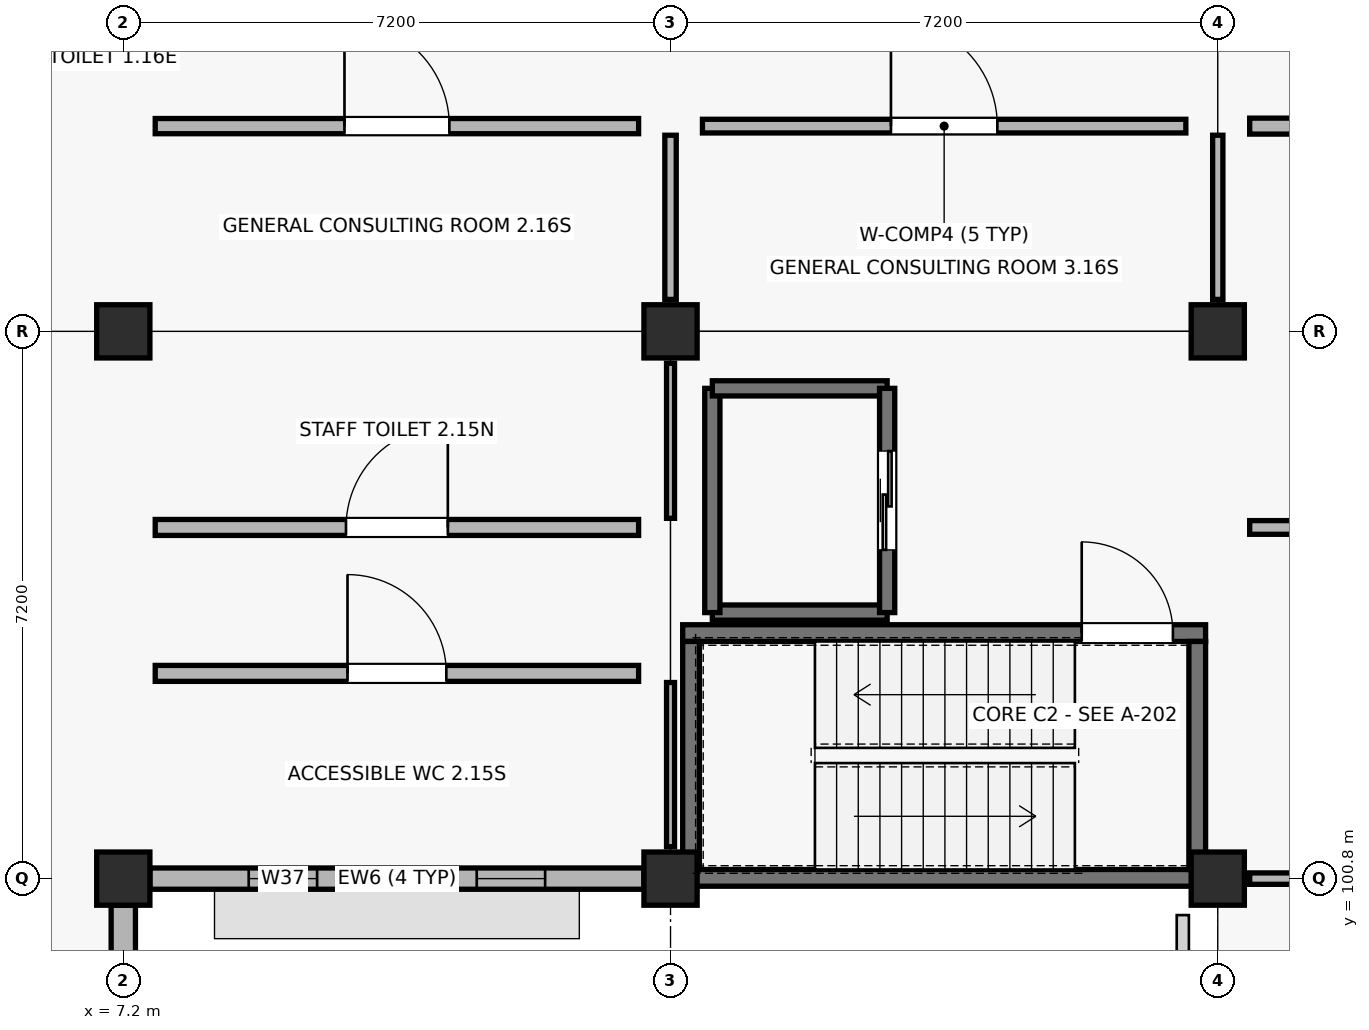
"""IFC4 building model, lengths in metres.
Left out: names, types, materials, properties, quantities, classifications, styles, units other than length and angle.
Written with IfcOpenShell. Run it as: python <this file> out.ifc"""

import sys

from ifc_helpers import new_model, si_unit, direction, frame, frame_2d, origin, origin_2d, place, context, subcontext, project, spatial, rectangle, extrude, element, fill, save


model = new_model("IFC4")
c1 = context("Model", 3, precision=1e-05, world=origin(), true_north=direction((0.0, 1.0)))
c2 = subcontext(c1, "Body", "Model", "MODEL_VIEW")
j1 = project(units=[si_unit("LENGTHUNIT", "METRE"), si_unit("PLANEANGLEUNIT", "RADIAN")], contexts=[c1])
p1 = place(None, origin())
s1 = spatial("IfcSite", under=j1, at=p1, CompositionType="ELEMENT")
p2 = place(p1, origin())
s2 = spatial("IfcBuilding", under=s1, at=p2, CompositionType="ELEMENT")
p3 = place(p2, frame((0.0, 0.0, 4.5)))
s3 = spatial("IfcBuildingStorey", under=s2, at=p3, CompositionType="ELEMENT", Elevation=4.5)
for number, where, z_axis, x_axis in (
    (1, (7.2, 100.8, 0.0), (0.0, 0.0, 1.0), (1.0, 0.0, 0.0)),
    (2, (7.2, 108.0, 0.0), (0.0, 0.0, 1.0), (1.0, 0.0, 0.0)),
    (3, (14.4, 100.8, 0.0), (0.0, 0.0, 1.0), (1.0, 0.0, 0.0)),
    (4, (14.4, 108.0, 0.0), (0.0, 0.0, 1.0), (1.0, 0.0, 0.0)),
    (5, (21.6, 100.8, 0.0), (0.0, 0.0, 1.0), (1.0, 0.0, 0.0)),
    (6, (21.6, 108.0, 0.0), (0.0, 0.0, 1.0), (1.0, 0.0, 0.0)),
):
    element("IfcColumn", number, at=place(p3, frame(where, z_axis=z_axis, x_axis=x_axis)), inside=s3, PredefinedType="COLUMN", context=c2, shape_type="SweptSolid", body=[
        extrude(rectangle(XDim=0.7, YDim=0.7, at=origin_2d()), origin(), (0.0, 0.0, 1.0), 4.5),
    ])
p4 = place(p3, frame((7.2, 93.95, 0.0), z_axis=(0.0, 0.0, 1.0), x_axis=(0.0, 1.0, 0.0)))
e7 = element("IfcWall", 7, at=p4, inside=s3, PredefinedType="STANDARD", context=c2, shape_type="SweptSolid", body=[
    extrude(rectangle(XDim=6.5, YDim=0.32, at=frame_2d((3.25, 0.0))), origin(), (0.0, 0.0, 1.0), 3.52),
])
p5 = place(p3, frame((7.55, 100.8, 0.0), z_axis=(0.0, 0.0, 1.0), x_axis=(1.0, 0.0, 0.0)))
e8 = element("IfcWall", 8, at=p5, inside=s3, PredefinedType="STANDARD", context=c2, shape_type="SweptSolid", body=[
    extrude(rectangle(XDim=6.5, YDim=0.28, at=frame_2d((3.25, 0.0))), origin(), (0.0, 0.0, 1.0), 3.47),
])
p6 = place(p5, frame((1.3, 0.0, 0.9)))
e9 = element("IfcOpeningElement", 9, at=p6, cuts=e8, PredefinedType="OPENING", context=c2, shape_type="SweptSolid", body=[
    extrude(rectangle(XDim=0.9, YDim=1.75, at=frame_2d((0.45, 0.875))), frame((0.0, 0.15, 0.0), z_axis=(0.0, -1.0, 0.0), x_axis=(1.0, 0.0, 0.0)), (0.0, 0.0, 1.0), 0.3),
])
p7 = place(p5, frame((4.3, 0.0, 0.9)))
e10 = element("IfcOpeningElement", 10, at=p7, cuts=e8, PredefinedType="OPENING", context=c2, shape_type="SweptSolid", body=[
    extrude(rectangle(XDim=0.9, YDim=1.75, at=frame_2d((0.45, 0.875))), frame((0.0, 0.15, 0.0), z_axis=(0.0, -1.0, 0.0), x_axis=(1.0, 0.0, 0.0)), (0.0, 0.0, 1.0), 0.3),
])
p8 = place(p3, frame((14.56, 100.81, 0.0), z_axis=(0.0, 0.0, 1.0), x_axis=(1.0, 0.0, 0.0)))
e11 = element("IfcWall", 11, at=p8, inside=s3, PredefinedType="SHEAR", context=c2, shape_type="SweptSolid", body=[
    extrude(rectangle(XDim=6.88, YDim=0.22, at=frame_2d((3.44, 0.0))), origin(), (0.0, 0.0, 1.0), 4.22),
])
p9 = place(p3, frame((14.56, 104.03, 0.0), z_axis=(0.0, 0.0, 1.0), x_axis=(1.0, 0.0, 0.0)))
e12 = element("IfcWall", 12, at=p9, inside=s3, PredefinedType="SHEAR", context=c2, shape_type="SweptSolid", body=[
    extrude(rectangle(XDim=6.88, YDim=0.22, at=frame_2d((3.44, 0.0))), origin(), (0.0, 0.0, 1.0), 4.22),
])
p10 = place(p9, frame((5.25, 0.0, 0.0)))
e13 = element("IfcOpeningElement", 13, at=p10, cuts=e12, PredefinedType="OPENING", context=c2, shape_type="SweptSolid", body=[
    extrude(rectangle(XDim=1.2, YDim=2.15, at=frame_2d((0.6, 1.075))), frame((0.0, 0.12, 0.0), z_axis=(0.0, -1.0, 0.0), x_axis=(1.0, 0.0, 0.0)), (0.0, 0.0, 1.0), 0.24),
])
for number, where, z_axis, x_axis in (
    (14, (14.67, 100.92, 0.0), (0.0, 0.0, 1.0), (0.0, 1.0, 0.0)),
    (15, (21.33, 100.92, 0.0), (0.0, 0.0, 1.0), (0.0, 1.0, 0.0)),
):
    element("IfcWall", number, at=place(p3, frame(where, z_axis=z_axis, x_axis=x_axis)), inside=s3, PredefinedType="SHEAR", context=c2, shape_type="SweptSolid", body=[
        extrude(rectangle(XDim=3.0, YDim=0.22, at=frame_2d((1.5, 0.0))), origin(), (0.0, 0.0, 1.0), 4.22),
    ])
p11 = place(p3, frame((14.95, 104.3, 0.0), z_axis=(0.0, 0.0, 1.0), x_axis=(1.0, 0.0, 0.0)))
e16 = element("IfcWall", 16, at=p11, inside=s3, PredefinedType="SHEAR", context=c2, shape_type="SweptSolid", body=[
    extrude(rectangle(XDim=2.3, YDim=0.2, at=frame_2d((1.15, 0.0))), origin(), (0.0, 0.0, 1.0), 4.22),
])
p12 = place(p3, frame((14.95, 104.3, 0.0), z_axis=(0.0, 0.0, 1.0), x_axis=(0.0, 1.0, 0.0)))
e17 = element("IfcWall", 17, at=p12, inside=s3, PredefinedType="SHEAR", context=c2, shape_type="SweptSolid", body=[
    extrude(rectangle(XDim=2.95, YDim=0.2, at=frame_2d((1.475, 0.0))), origin(), (0.0, 0.0, 1.0), 4.22),
])
p13 = place(p3, frame((14.95, 107.25, 0.0), z_axis=(0.0, 0.0, 1.0), x_axis=(1.0, 0.0, 0.0)))
e18 = element("IfcWall", 18, at=p13, inside=s3, PredefinedType="SHEAR", context=c2, shape_type="SweptSolid", body=[
    extrude(rectangle(XDim=2.3, YDim=0.2, at=frame_2d((1.15, 0.0))), origin(), (0.0, 0.0, 1.0), 4.22),
])
p14 = place(p3, frame((17.25, 104.3, 0.0), z_axis=(0.0, 0.0, 1.0), x_axis=(0.0, 1.0, 0.0)))
e19 = element("IfcWall", 19, at=p14, inside=s3, PredefinedType="SHEAR", context=c2, shape_type="SweptSolid", body=[
    extrude(rectangle(XDim=2.95, YDim=0.2, at=frame_2d((1.475, 0.0))), origin(), (0.0, 0.0, 1.0), 4.22),
])
p15 = place(p14, frame((0.825, 0.0, 0.0)))
e20 = element("IfcOpeningElement", 20, at=p15, cuts=e19, PredefinedType="OPENING", context=c2, shape_type="SweptSolid", body=[
    extrude(rectangle(XDim=1.3, YDim=2.15, at=frame_2d((0.65, 1.075))), frame((0.0, 0.11, 0.0), z_axis=(0.0, -1.0, 0.0), x_axis=(1.0, 0.0, 0.0)), (0.0, 0.0, 1.0), 0.22),
])
p16 = place(p3, frame((7.62, 103.5, 0.0), z_axis=(0.0, 0.0, 1.0), x_axis=(1.0, 0.0, 0.0)))
e21 = element("IfcWall", 21, at=p16, inside=s3, PredefinedType="PLUMBINGWALL", context=c2, shape_type="SweptSolid", body=[
    extrude(rectangle(XDim=6.36, YDim=0.21, at=frame_2d((3.18, 0.0))), origin(), (0.0, 0.0, 1.0), 3.36),
])
p17 = place(p16, frame((2.53, 0.0, 0.0)))
e22 = element("IfcOpeningElement", 22, at=p17, cuts=e21, PredefinedType="OPENING", context=c2, shape_type="SweptSolid", body=[
    extrude(rectangle(XDim=1.3, YDim=2.19, at=frame_2d((0.65, 1.095))), frame((0.0, 0.115, 0.0), z_axis=(0.0, -1.0, 0.0), x_axis=(1.0, 0.0, 0.0)), (0.0, 0.0, 1.0), 0.23),
])
p18 = place(p3, frame((14.4, 101.22, 0.0), z_axis=(0.0, 0.0, 1.0), x_axis=(0.0, 1.0, 0.0)))
e23 = element("IfcWall", 23, at=p18, inside=s3, PredefinedType="PARTITIONING", context=c2, shape_type="SweptSolid", body=[
    extrude(rectangle(XDim=2.16, YDim=0.105, at=frame_2d((1.08, 0.0))), origin(), (0.0, 0.0, 1.0), 3.36),
])
p19 = place(p3, frame((7.62, 105.42, 0.0), z_axis=(0.0, 0.0, 1.0), x_axis=(1.0, 0.0, 0.0)))
e24 = element("IfcWall", 24, at=p19, inside=s3, PredefinedType="PLUMBINGWALL", context=c2, shape_type="SweptSolid", body=[
    extrude(rectangle(XDim=6.36, YDim=0.21, at=frame_2d((3.18, 0.0))), origin(), (0.0, 0.0, 1.0), 3.36),
])
p20 = place(p19, frame((2.51, 0.0, 0.0)))
e25 = element("IfcOpeningElement", 25, at=p20, cuts=e24, PredefinedType="OPENING", context=c2, shape_type="SweptSolid", body=[
    extrude(rectangle(XDim=1.34, YDim=2.19, at=frame_2d((0.67, 1.095))), frame((0.0, 0.115, 0.0), z_axis=(0.0, -1.0, 0.0), x_axis=(1.0, 0.0, 0.0)), (0.0, 0.0, 1.0), 0.23),
])
p21 = place(p3, frame((14.4, 105.54, 0.0), z_axis=(0.0, 0.0, 1.0), x_axis=(0.0, 1.0, 0.0)))
e26 = element("IfcWall", 26, at=p21, inside=s3, PredefinedType="PARTITIONING", context=c2, shape_type="SweptSolid", body=[
    extrude(rectangle(XDim=2.04, YDim=0.105, at=frame_2d((1.02, 0.0))), origin(), (0.0, 0.0, 1.0), 3.36),
])
p22 = place(p3, frame((7.62, 110.7, 0.0), z_axis=(0.0, 0.0, 1.0), x_axis=(1.0, 0.0, 0.0)))
e27 = element("IfcWall", 27, at=p22, inside=s3, PredefinedType="SOLIDWALL", context=c2, shape_type="SweptSolid", body=[
    extrude(rectangle(XDim=6.36, YDim=0.2, at=frame_2d((3.18, 0.0))), origin(), (0.0, 0.0, 1.0), 3.36),
])
p23 = place(p22, frame((2.49, 0.0, 0.0)))
e28 = element("IfcOpeningElement", 28, at=p23, cuts=e27, PredefinedType="OPENING", context=c2, shape_type="SweptSolid", body=[
    extrude(rectangle(XDim=1.38, YDim=2.19, at=frame_2d((0.69, 1.095))), frame((0.0, 0.11, 0.0), z_axis=(0.0, -1.0, 0.0), x_axis=(1.0, 0.0, 0.0)), (0.0, 0.0, 1.0), 0.22),
])
p24 = place(p3, frame((14.4, 108.42, 0.0), z_axis=(0.0, 0.0, 1.0), x_axis=(0.0, 1.0, 0.0)))
e29 = element("IfcWall", 29, at=p24, inside=s3, PredefinedType="PARTITIONING", context=c2, shape_type="SweptSolid", body=[
    extrude(rectangle(XDim=2.16, YDim=0.15, at=frame_2d((1.08, 0.0))), origin(), (0.0, 0.0, 1.0), 3.36),
])
p25 = place(p3, frame((14.82, 110.7, 0.0), z_axis=(0.0, 0.0, 1.0), x_axis=(1.0, 0.0, 0.0)))
e30 = element("IfcWall", 30, at=p25, inside=s3, PredefinedType="PARTITIONING", context=c2, shape_type="SweptSolid", body=[
    extrude(rectangle(XDim=6.36, YDim=0.18, at=frame_2d((3.18, 0.0))), origin(), (0.0, 0.0, 1.0), 3.36),
])
p26 = place(p25, frame((2.48, 0.0, 0.0)))
e31 = element("IfcOpeningElement", 31, at=p26, cuts=e30, PredefinedType="OPENING", context=c2, shape_type="SweptSolid", body=[
    extrude(rectangle(XDim=1.4, YDim=2.2, at=frame_2d((0.7, 1.1))), frame((0.0, 0.1, 0.0), z_axis=(0.0, -1.0, 0.0), x_axis=(1.0, 0.0, 0.0)), (0.0, 0.0, 1.0), 0.2),
])
p27 = place(p3, frame((21.6, 108.42, 0.0), z_axis=(0.0, 0.0, 1.0), x_axis=(0.0, 1.0, 0.0)))
e32 = element("IfcWall", 32, at=p27, inside=s3, PredefinedType="PARTITIONING", context=c2, shape_type="SweptSolid", body=[
    extrude(rectangle(XDim=2.16, YDim=0.135, at=frame_2d((1.08, 0.0))), origin(), (0.0, 0.0, 1.0), 3.36),
])
p28 = place(p3, frame((22.02, 100.8, 0.0), z_axis=(0.0, 0.0, 1.0), x_axis=(1.0, 0.0, 0.0)))
e33 = element("IfcWall", 33, at=p28, inside=s3, PredefinedType="PARTITIONING", context=c2, shape_type="SweptSolid", body=[
    extrude(rectangle(XDim=2.16, YDim=0.15, at=frame_2d((1.08, 0.0))), origin(), (0.0, 0.0, 1.0), 3.36),
])
p29 = place(p3, frame((22.02, 105.42, 0.0), z_axis=(0.0, 0.0, 1.0), x_axis=(1.0, 0.0, 0.0)))
e34 = element("IfcWall", 34, at=p29, inside=s3, PredefinedType="PARTITIONING", context=c2, shape_type="SweptSolid", body=[
    extrude(rectangle(XDim=2.22, YDim=0.18, at=frame_2d((1.11, 0.0))), origin(), (0.0, 0.0, 1.0), 3.36),
])
p30 = place(p29, frame((0.66, 0.0, 0.0)))
e35 = element("IfcOpeningElement", 35, at=p30, cuts=e34, PredefinedType="OPENING", context=c2, shape_type="SweptSolid", body=[
    extrude(rectangle(XDim=0.9, YDim=2.04, at=frame_2d((0.45, 1.02))), frame((0.0, 0.1, 0.0), z_axis=(0.0, -1.0, 0.0), x_axis=(1.0, 0.0, 0.0)), (0.0, 0.0, 1.0), 0.2),
])
p31 = place(p3, frame((22.02, 110.7, 0.0), z_axis=(0.0, 0.0, 1.0), x_axis=(1.0, 0.0, 0.0)))
e36 = element("IfcWall", 36, at=p31, inside=s3, PredefinedType="PLUMBINGWALL", context=c2, shape_type="SweptSolid", body=[
    extrude(rectangle(XDim=6.36, YDim=0.21, at=frame_2d((3.18, 0.0))), origin(), (0.0, 0.0, 1.0), 3.36),
])
p32 = place(p31, frame((2.47, 0.0, 0.0)))
e37 = element("IfcOpeningElement", 37, at=p32, cuts=e36, PredefinedType="OPENING", context=c2, shape_type="SweptSolid", body=[
    extrude(rectangle(XDim=1.42, YDim=2.04, at=frame_2d((0.71, 1.02))), frame((0.0, 0.115, 0.0), z_axis=(0.0, -1.0, 0.0), x_axis=(1.0, 0.0, 0.0)), (0.0, 0.0, 1.0), 0.23),
])
p33 = place(p6, origin())
e38 = element("IfcWindow", 38, at=p33, inside=s3, PartitioningType="SINGLE_PANEL", PredefinedType="WINDOW", context=c2, shape_type="SweptSolid", body=[
    extrude(rectangle(XDim=0.9, YDim=1.75, at=frame_2d((0.45, 0.875))), frame((0.0, 0.03, 0.0), z_axis=(0.0, -1.0, 0.0), x_axis=(1.0, 0.0, 0.0)), (0.0, 0.0, 1.0), 0.06),
])
fill(e9, e38)
p34 = place(p7, origin())
e39 = element("IfcWindow", 39, at=p34, inside=s3, PartitioningType="SINGLE_PANEL", PredefinedType="WINDOW", context=c2, shape_type="SweptSolid", body=[
    extrude(rectangle(XDim=0.9, YDim=1.75, at=frame_2d((0.45, 0.875))), frame((0.0, 0.03, 0.0), z_axis=(0.0, -1.0, 0.0), x_axis=(1.0, 0.0, 0.0)), (0.0, 0.0, 1.0), 0.06),
])
fill(e10, e39)
p35 = place(p10, origin())
e40 = element("IfcDoor", 40, at=p35, inside=s3, OperationType="SINGLE_SWING_LEFT", PredefinedType="DOOR", context=c2, shape_type="SweptSolid", body=[
    extrude(rectangle(XDim=1.2, YDim=2.15, at=frame_2d((0.6, 1.075))), frame((0.0, 0.025, 0.0), z_axis=(0.0, -1.0, 0.0), x_axis=(1.0, 0.0, 0.0)), (0.0, 0.0, 1.0), 0.05),
])
fill(e13, e40)
p36 = place(p15, origin())
e41 = element("IfcDoor", 41, at=p36, inside=s3, OperationType="SLIDING_TO_LEFT", PredefinedType="DOOR", context=c2, shape_type="SweptSolid", body=[
    extrude(rectangle(XDim=1.3, YDim=2.15, at=frame_2d((0.65, 1.075))), frame((0.0, 0.025, 0.0), z_axis=(0.0, -1.0, 0.0), x_axis=(1.0, 0.0, 0.0)), (0.0, 0.0, 1.0), 0.05),
])
fill(e20, e41)
p37 = place(p17, origin())
e42 = element("IfcDoor", 42, at=p37, inside=s3, OperationType="SINGLE_SWING_LEFT", PredefinedType="DOOR", context=c2, shape_type="SweptSolid", body=[
    extrude(rectangle(XDim=1.3, YDim=2.19, at=frame_2d((0.65, 1.095))), frame((0.0, 0.025, 0.0), z_axis=(0.0, -1.0, 0.0), x_axis=(1.0, 0.0, 0.0)), (0.0, 0.0, 1.0), 0.05),
])
fill(e22, e42)
p38 = place(p20, origin())
e43 = element("IfcDoor", 43, at=p38, inside=s3, OperationType="SINGLE_SWING_RIGHT", PredefinedType="DOOR", context=c2, shape_type="SweptSolid", body=[
    extrude(rectangle(XDim=1.34, YDim=2.19, at=frame_2d((0.67, 1.095))), frame((0.0, 0.025, 0.0), z_axis=(0.0, -1.0, 0.0), x_axis=(1.0, 0.0, 0.0)), (0.0, 0.0, 1.0), 0.05),
])
fill(e25, e43)
p39 = place(p23, origin())
e44 = element("IfcDoor", 44, at=p39, inside=s3, OperationType="SINGLE_SWING_LEFT", PredefinedType="DOOR", context=c2, shape_type="SweptSolid", body=[
    extrude(rectangle(XDim=1.38, YDim=2.19, at=frame_2d((0.69, 1.095))), frame((0.0, 0.025, 0.0), z_axis=(0.0, -1.0, 0.0), x_axis=(1.0, 0.0, 0.0)), (0.0, 0.0, 1.0), 0.05),
])
fill(e28, e44)
p40 = place(p26, origin())
e45 = element("IfcDoor", 45, at=p40, inside=s3, OperationType="SINGLE_SWING_LEFT", PredefinedType="DOOR", context=c2, shape_type="SweptSolid", body=[
    extrude(rectangle(XDim=1.4, YDim=2.2, at=frame_2d((0.7, 1.1))), frame((0.0, 0.025, 0.0), z_axis=(0.0, -1.0, 0.0), x_axis=(1.0, 0.0, 0.0)), (0.0, 0.0, 1.0), 0.05),
])
fill(e31, e45)
save(model, sys.argv[1])
